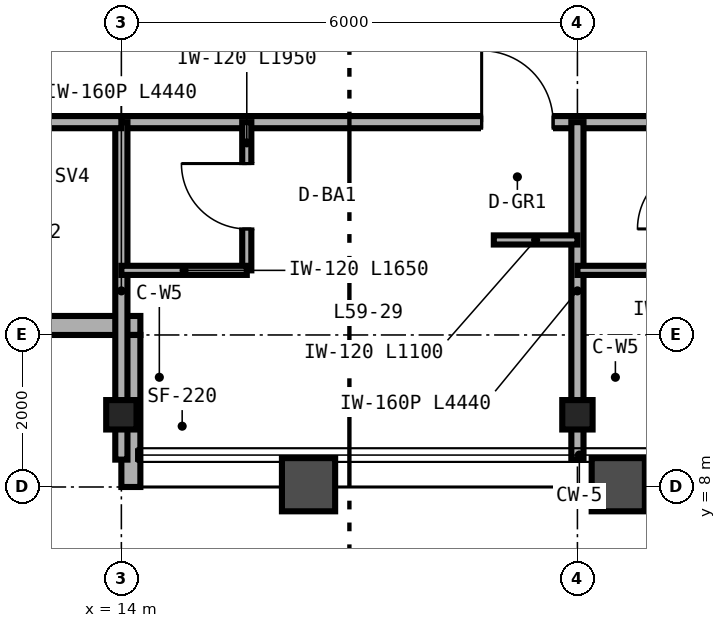
"""IFC4 building model, lengths in metres.
Left out: names, types, materials, properties, quantities, classifications, styles, units other than length and angle.
Written with IfcOpenShell. Run it as: python <this file> out.ifc"""

import sys

from ifc_helpers import new_model, si_unit, direction, frame, frame_2d, origin, origin_2d, place, context, subcontext, project, spatial, rectangle, i_section, extrude, source, transform, mapped, element, fill, save


model = new_model("IFC4")
c1 = context("Model", 3, precision=1e-05, world=origin(), true_north=direction((0.0, 1.0)))
c2 = subcontext(c1, "Body", "Model", "MODEL_VIEW")
j1 = project(units=[si_unit("LENGTHUNIT", "METRE"), si_unit("PLANEANGLEUNIT", "RADIAN")], contexts=[c1])
p1 = place(None, origin())
s1 = spatial("IfcSite", under=j1, at=p1, CompositionType="ELEMENT")
p2 = place(p1, origin())
s2 = spatial("IfcBuilding", under=s1, at=p2, CompositionType="ELEMENT")
p3 = place(p2, frame((0.0, 0.0, 236.4)))
s3 = spatial("IfcBuildingStorey", under=s2, at=p3, CompositionType="ELEMENT", Elevation=236.4)
m1 = source(origin(), c2, "Body", "SweptSolid", [
    extrude(i_section(OverallWidth=0.399, OverallDepth=0.387, WebThickness=0.021, FlangeThickness=0.033, FilletRadius=0.025, at=origin_2d()), origin(), (0.0, 0.0, 1.0), 3.38),
])
for number, where, z_axis, x_axis in (
    (1, (14.0, 8.95, 0.0), (0.0, 0.0, 1.0), (1.0, 0.0, 0.0)),
    (2, (20.0, 8.95, 0.0), (0.0, 0.0, 1.0), (1.0, 0.0, 0.0)),
):
    element("IfcColumn", number, at=place(p3, frame(where, z_axis=z_axis, x_axis=x_axis)), inside=s3, PredefinedType="COLUMN", context=c2, shape_type="MappedRepresentation", body=[
        mapped(m1, transform((0.0, 0.0, 0.0), scale=1.0)),
    ])
p4 = place(p3, frame((12.25, 10.125, 0.0), z_axis=(0.0, 0.0, 1.0), x_axis=(1.0, 0.0, 0.0)))
e3 = element("IfcWall", 3, at=p4, inside=s3, PredefinedType="SOLIDWALL", context=c2, shape_type="SweptSolid", body=[
    extrude(rectangle(XDim=2.0, YDim=0.25, at=frame_2d((1.0, 0.0))), origin(), (0.0, 0.0, 1.0), 3.38),
])
p5 = place(p3, frame((14.125, 10.0, 0.0), z_axis=(0.0, 0.0, 1.0), x_axis=(0.0, -1.0, 0.0)))
e4 = element("IfcWall", 4, at=p5, inside=s3, PredefinedType="SOLIDWALL", context=c2, shape_type="SweptSolid", body=[
    extrude(rectangle(XDim=2.0, YDim=0.25, at=frame_2d((1.0, 0.0))), origin(), (0.0, 0.0, 1.0), 2.687),
])
p6 = place(p3, frame((14.0, 12.8, 0.0), z_axis=(0.0, 0.0, 1.0), x_axis=(1.0, 0.0, 0.0)))
e5 = element("IfcWall", 5, at=p6, inside=s3, PredefinedType="PARTITIONING", context=c2, shape_type="SweptSolid", body=[
    extrude(rectangle(XDim=12.0, YDim=0.16, at=frame_2d((6.0, 0.0))), origin(), (0.0, 0.0, 1.0), 2.923),
])
p7 = place(p6, frame((4.74, 0.0, 0.0)))
e6 = element("IfcOpeningElement", 6, at=p7, cuts=e5, PredefinedType="OPENING", context=c2, shape_type="SweptSolid", body=[
    extrude(rectangle(XDim=0.94, YDim=2.15, at=frame_2d((0.47, 1.075))), frame((0.0, 0.09, 0.0), z_axis=(0.0, -1.0, 0.0), x_axis=(1.0, 0.0, 0.0)), (0.0, 0.0, 1.0), 0.18),
])
p8 = place(p6, frame((10.74, 0.0, 0.0)))
e7 = element("IfcOpeningElement", 7, at=p8, cuts=e5, PredefinedType="OPENING", context=c2, shape_type="SweptSolid", body=[
    extrude(rectangle(XDim=0.94, YDim=2.15, at=frame_2d((0.47, 1.075))), frame((0.0, 0.09, 0.0), z_axis=(0.0, -1.0, 0.0), x_axis=(1.0, 0.0, 0.0)), (0.0, 0.0, 1.0), 0.18),
])
for number, where, z_axis, x_axis in (
    (8, (14.0, 8.36, 0.0), (0.0, 0.0, 1.0), (0.0, 1.0, 0.0)),
    (9, (20.0, 8.36, 0.0), (0.0, 0.0, 1.0), (0.0, 1.0, 0.0)),
):
    element("IfcWall", number, at=place(p3, frame(where, z_axis=z_axis, x_axis=x_axis)), inside=s3, PredefinedType="PARTITIONING", context=c2, shape_type="SweptSolid", body=[
        extrude(rectangle(XDim=4.44, YDim=0.16, at=frame_2d((2.22, 0.0))), origin(), (0.0, 0.0, 1.0), 2.687),
    ])
p9 = place(p3, frame((15.65, 10.85, 0.0), z_axis=(0.0, 0.0, 1.0), x_axis=(0.0, 1.0, 0.0)))
e10 = element("IfcWall", 10, at=p9, inside=s3, PredefinedType="PARTITIONING", context=c2, shape_type="SweptSolid", body=[
    extrude(rectangle(XDim=1.95, YDim=0.12, at=frame_2d((0.975, 0.0))), origin(), (0.0, 0.0, 1.0), 3.38),
])
p10 = place(p9, frame((0.545, 0.0, 0.0)))
e11 = element("IfcOpeningElement", 11, at=p10, cuts=e10, PredefinedType="OPENING", context=c2, shape_type="SweptSolid", body=[
    extrude(rectangle(XDim=0.86, YDim=2.1, at=frame_2d((0.43, 1.05))), frame((0.0, 0.07, 0.0), z_axis=(0.0, -1.0, 0.0), x_axis=(1.0, 0.0, 0.0)), (0.0, 0.0, 1.0), 0.14),
])
p11 = place(p3, frame((14.0, 10.85, 0.0), z_axis=(0.0, 0.0, 1.0), x_axis=(1.0, 0.0, 0.0)))
e12 = element("IfcWall", 12, at=p11, inside=s3, PredefinedType="PARTITIONING", context=c2, shape_type="SweptSolid", body=[
    extrude(rectangle(XDim=1.65, YDim=0.12, at=frame_2d((0.825, 0.0))), origin(), (0.0, 0.0, 1.0), 3.38),
])
p12 = place(p3, frame((18.9, 11.25, 0.0), z_axis=(0.0, 0.0, 1.0), x_axis=(1.0, 0.0, 0.0)))
e13 = element("IfcWall", 13, at=p12, inside=s3, PredefinedType="PARTITIONING", context=c2, shape_type="SweptSolid", body=[
    extrude(rectangle(XDim=1.1, YDim=0.12, at=frame_2d((0.55, 0.0))), origin(), (0.0, 0.0, 1.0), 3.38),
])
p13 = place(p3, frame((20.0, 10.85, 0.0), z_axis=(0.0, 0.0, 1.0), x_axis=(1.0, 0.0, 0.0)))
e14 = element("IfcWall", 14, at=p13, inside=s3, PredefinedType="PARTITIONING", context=c2, shape_type="SweptSolid", body=[
    extrude(rectangle(XDim=1.65, YDim=0.12, at=frame_2d((0.825, 0.0))), origin(), (0.0, 0.0, 1.0), 3.38),
])
p14 = place(p3, frame((10.0, 12.8, 0.0), z_axis=(0.0, 0.0, 1.0), x_axis=(1.0, 0.0, 0.0)))
e15 = element("IfcWall", 15, at=p14, inside=s3, PredefinedType="PARTITIONING", context=c2, shape_type="SweptSolid", body=[
    extrude(rectangle(XDim=4.0, YDim=0.16, at=frame_2d((2.0, 0.0))), origin(), (0.0, 0.0, 1.0), 3.38),
])
p15 = place(p14, frame((1.52, 0.0, 0.0)))
e16 = element("IfcOpeningElement", 16, at=p15, cuts=e15, PredefinedType="OPENING", context=c2, shape_type="SweptSolid", body=[
    extrude(rectangle(XDim=0.96, YDim=2.15, at=frame_2d((0.48, 1.075))), frame((0.0, 0.09, 0.0), z_axis=(0.0, -1.0, 0.0), x_axis=(1.0, 0.0, 0.0)), (0.0, 0.0, 1.0), 0.18),
])
m2 = source(origin(), c2, "Body", "SweptSolid", [
    extrude(rectangle(XDim=0.86, YDim=2.1, at=frame_2d((0.43, 1.05))), frame((0.0, 0.025, 0.0), z_axis=(0.0, -1.0, 0.0), x_axis=(1.0, 0.0, 0.0)), (0.0, 0.0, 1.0), 0.05),
])
p16 = place(p10, origin())
e17 = element("IfcDoor", 17, at=p16, inside=s3, OperationType="SINGLE_SWING_RIGHT", PredefinedType="DOOR", context=c2, shape_type="MappedRepresentation", body=[
    mapped(m2, transform((0.0, 0.0, 0.0), scale=1.0)),
])
fill(e11, e17)
m3 = source(origin(), c2, "Body", "SweptSolid", [
    extrude(rectangle(XDim=0.94, YDim=2.15, at=frame_2d((0.47, 1.075))), frame((0.0, 0.025, 0.0), z_axis=(0.0, -1.0, 0.0), x_axis=(1.0, 0.0, 0.0)), (0.0, 0.0, 1.0), 0.05),
])
p17 = place(p7, origin())
e18 = element("IfcDoor", 18, at=p17, inside=s3, OperationType="SINGLE_SWING_LEFT", PredefinedType="DOOR", context=c2, shape_type="MappedRepresentation", body=[
    mapped(m3, transform((0.0, 0.0, 0.0), scale=1.0)),
])
fill(e6, e18)
save(model, sys.argv[1])
